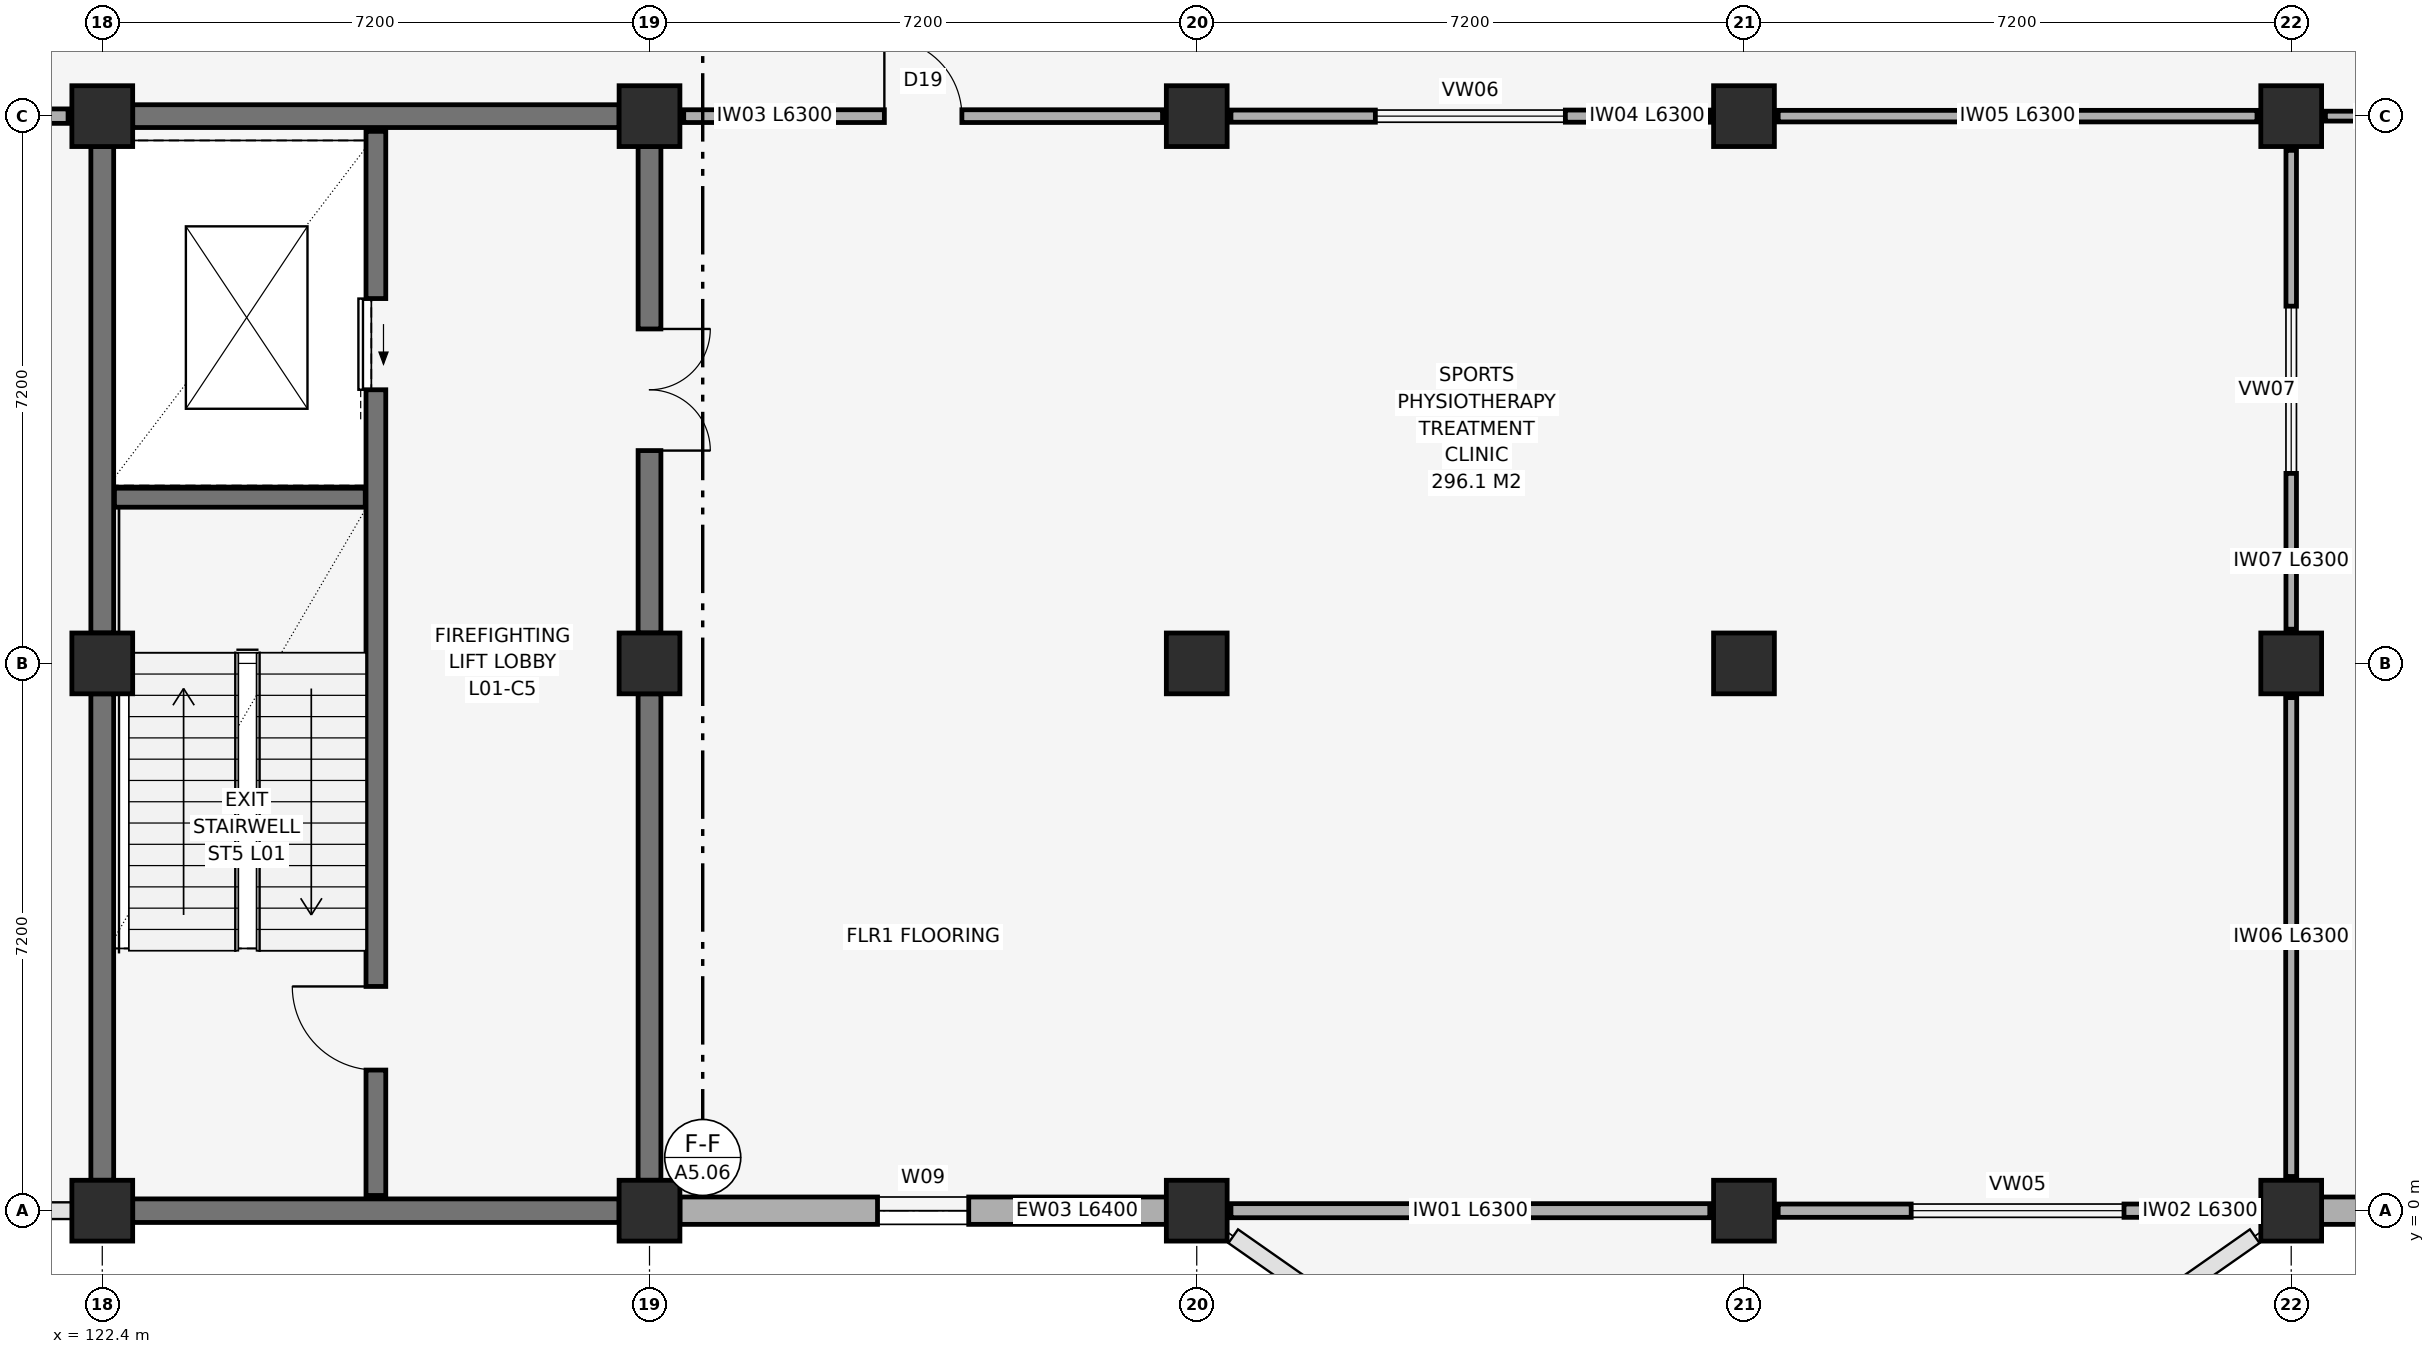
"""IFC4 building model, lengths in metres.
Left out: names, types, materials, properties, quantities, classifications, styles, units other than length and angle.
Written with IfcOpenShell. Run it as: python <this file> out.ifc"""

import sys

from ifc_helpers import new_model, si_unit, direction, frame, frame_2d, origin, origin_2d, place, context, subcontext, project, spatial, rectangle, extrude, element, fill, save


model = new_model("IFC4")
c1 = context("Model", 3, precision=1e-05, world=origin(), true_north=direction((0.0, 1.0)))
c2 = subcontext(c1, "Body", "Model", "MODEL_VIEW")
j1 = project(units=[si_unit("LENGTHUNIT", "METRE"), si_unit("PLANEANGLEUNIT", "RADIAN")], contexts=[c1])
p1 = place(None, origin())
s1 = spatial("IfcSite", under=j1, at=p1, CompositionType="ELEMENT")
p2 = place(p1, origin())
s2 = spatial("IfcBuilding", under=s1, at=p2, CompositionType="ELEMENT")
p3 = place(p2, frame((0.0, 0.0, 5.4)))
s3 = spatial("IfcBuildingStorey", under=s2, at=p3, CompositionType="ELEMENT", Elevation=5.4)
for number, where, z_axis, x_axis in (
    (1, (122.4, 0.0, 0.0), (0.0, 0.0, 1.0), (1.0, 0.0, 0.0)),
    (2, (122.4, 7.2, 0.0), (0.0, 0.0, 1.0), (1.0, 0.0, 0.0)),
    (3, (122.4, 14.4, 0.0), (0.0, 0.0, 1.0), (1.0, 0.0, 0.0)),
    (4, (129.6, 0.0, 0.0), (0.0, 0.0, 1.0), (1.0, 0.0, 0.0)),
    (5, (129.6, 7.2, 0.0), (0.0, 0.0, 1.0), (1.0, 0.0, 0.0)),
    (6, (129.6, 14.4, 0.0), (0.0, 0.0, 1.0), (1.0, 0.0, 0.0)),
    (7, (136.8, 0.0, 0.0), (0.0, 0.0, 1.0), (1.0, 0.0, 0.0)),
    (8, (136.8, 7.2, 0.0), (0.0, 0.0, 1.0), (1.0, 0.0, 0.0)),
    (9, (136.8, 14.4, 0.0), (0.0, 0.0, 1.0), (1.0, 0.0, 0.0)),
    (10, (144.0, 0.0, 0.0), (0.0, 0.0, 1.0), (1.0, 0.0, 0.0)),
    (11, (144.0, 7.2, 0.0), (0.0, 0.0, 1.0), (1.0, 0.0, 0.0)),
    (12, (144.0, 14.4, 0.0), (0.0, 0.0, 1.0), (1.0, 0.0, 0.0)),
    (13, (151.2, 0.0, 0.0), (0.0, 0.0, 1.0), (1.0, 0.0, 0.0)),
    (14, (151.2, 7.2, 0.0), (0.0, 0.0, 1.0), (1.0, 0.0, 0.0)),
    (15, (151.2, 14.4, 0.0), (0.0, 0.0, 1.0), (1.0, 0.0, 0.0)),
):
    element("IfcColumn", number, at=place(p3, frame(where, z_axis=z_axis, x_axis=x_axis)), inside=s3, PredefinedType="COLUMN", context=c2, shape_type="SweptSolid", body=[
        extrude(rectangle(XDim=0.8, YDim=0.8, at=origin_2d()), origin(), (0.0, 0.0, 1.0), 4.8),
    ])
p4 = place(p3, frame((130.0, 0.0, 0.0), z_axis=(0.0, 0.0, 1.0), x_axis=(1.0, 0.0, 0.0)))
e16 = element("IfcWall", 16, at=p4, inside=s3, PredefinedType="SOLIDWALL", context=c2, shape_type="SweptSolid", body=[
    extrude(rectangle(XDim=6.4, YDim=0.36, at=frame_2d((3.2, 0.0))), origin(), (0.0, 0.0, 1.0), 4.19),
])
p5 = place(p4, frame((2.6, 0.0, 0.95)))
e17 = element("IfcOpeningElement", 17, at=p5, cuts=e16, PredefinedType="OPENING", context=c2, shape_type="SweptSolid", body=[
    extrude(rectangle(XDim=1.2, YDim=2.0, at=frame_2d((0.6, 1.0))), frame((0.0, 0.195, 0.0), z_axis=(0.0, -1.0, 0.0), x_axis=(1.0, 0.0, 0.0)), (0.0, 0.0, 1.0), 0.39),
])
p6 = place(p3, frame((151.6, 0.0, 0.0), z_axis=(0.0, 0.0, 1.0), x_axis=(1.0, 0.0, 0.0)))
e18 = element("IfcWall", 18, at=p6, inside=s3, PredefinedType="SOLIDWALL", context=c2, shape_type="SweptSolid", body=[
    extrude(rectangle(XDim=6.4, YDim=0.36, at=frame_2d((3.2, 0.0))), origin(), (0.0, 0.0, 1.0), 4.19),
])
p7 = place(p6, frame((2.15, 0.0, 0.95)))
e19 = element("IfcOpeningElement", 19, at=p7, cuts=e18, PredefinedType="OPENING", context=c2, shape_type="SweptSolid", body=[
    extrude(rectangle(XDim=2.1, YDim=2.65, at=frame_2d((1.05, 1.325))), frame((0.0, 0.195, 0.0), z_axis=(0.0, -1.0, 0.0), x_axis=(1.0, 0.0, 0.0)), (0.0, 0.0, 1.0), 0.39),
])
p8 = place(p3, frame((122.8, 0.0, 0.0), z_axis=(0.0, 0.0, 1.0), x_axis=(1.0, 0.0, 0.0)))
e20 = element("IfcWall", 20, at=p8, inside=s3, PredefinedType="SHEAR", context=c2, shape_type="SweptSolid", body=[
    extrude(rectangle(XDim=6.4, YDim=0.31, at=frame_2d((3.2, 0.0))), origin(), (0.0, 0.0, 1.0), 4.54),
])
p9 = place(p3, frame((122.8, 14.4, 0.0), z_axis=(0.0, 0.0, 1.0), x_axis=(1.0, 0.0, 0.0)))
e21 = element("IfcWall", 21, at=p9, inside=s3, PredefinedType="SHEAR", context=c2, shape_type="SweptSolid", body=[
    extrude(rectangle(XDim=6.4, YDim=0.3, at=frame_2d((3.2, 0.0))), origin(), (0.0, 0.0, 1.0), 4.54),
])
p10 = place(p3, frame((122.4, 0.4, 0.0), z_axis=(0.0, 0.0, 1.0), x_axis=(0.0, 1.0, 0.0)))
e22 = element("IfcWall", 22, at=p10, inside=s3, PredefinedType="SHEAR", context=c2, shape_type="SweptSolid", body=[
    extrude(rectangle(XDim=6.4, YDim=0.3, at=frame_2d((3.2, 0.0))), origin(), (0.0, 0.0, 1.0), 4.54),
])
p11 = place(p3, frame((122.4, 7.6, 0.0), z_axis=(0.0, 0.0, 1.0), x_axis=(0.0, 1.0, 0.0)))
e23 = element("IfcWall", 23, at=p11, inside=s3, PredefinedType="SHEAR", context=c2, shape_type="SweptSolid", body=[
    extrude(rectangle(XDim=6.4, YDim=0.3, at=frame_2d((3.2, 0.0))), origin(), (0.0, 0.0, 1.0), 4.54),
])
p12 = place(p3, frame((129.6, 0.4, 0.0), z_axis=(0.0, 0.0, 1.0), x_axis=(0.0, 1.0, 0.0)))
e24 = element("IfcWall", 24, at=p12, inside=s3, PredefinedType="SHEAR", context=c2, shape_type="SweptSolid", body=[
    extrude(rectangle(XDim=6.4, YDim=0.3, at=frame_2d((3.2, 0.0))), origin(), (0.0, 0.0, 1.0), 4.54),
])
p13 = place(p3, frame((129.6, 7.6, 0.0), z_axis=(0.0, 0.0, 1.0), x_axis=(0.0, 1.0, 0.0)))
e25 = element("IfcWall", 25, at=p13, inside=s3, PredefinedType="SHEAR", context=c2, shape_type="SweptSolid", body=[
    extrude(rectangle(XDim=6.4, YDim=0.3, at=frame_2d((3.2, 0.0))), origin(), (0.0, 0.0, 1.0), 4.54),
])
p14 = place(p13, frame((2.4, 0.0, 0.0)))
e26 = element("IfcOpeningElement", 26, at=p14, cuts=e25, PredefinedType="OPENING", context=c2, shape_type="SweptSolid", body=[
    extrude(rectangle(XDim=1.6, YDim=2.2, at=frame_2d((0.8, 1.1))), frame((0.0, 0.165, 0.0), z_axis=(0.0, -1.0, 0.0), x_axis=(1.0, 0.0, 0.0)), (0.0, 0.0, 1.0), 0.33),
])
p15 = place(p3, frame((126.0, 0.2, 0.0), z_axis=(0.0, 0.0, 1.0), x_axis=(0.0, 1.0, 0.0)))
e27 = element("IfcWall", 27, at=p15, inside=s3, PredefinedType="SHEAR", context=c2, shape_type="SweptSolid", body=[
    extrude(rectangle(XDim=14.0, YDim=0.26, at=frame_2d((7.0, 0.0))), origin(), (0.0, 0.0, 1.0), 4.54),
])
p16 = place(p15, frame((1.65, 0.0, 0.0)))
e28 = element("IfcOpeningElement", 28, at=p16, cuts=e27, PredefinedType="OPENING", context=c2, shape_type="SweptSolid", body=[
    extrude(rectangle(XDim=1.1, YDim=2.15, at=frame_2d((0.55, 1.075))), frame((0.0, 0.145, 0.0), z_axis=(0.0, -1.0, 0.0), x_axis=(1.0, 0.0, 0.0)), (0.0, 0.0, 1.0), 0.29),
])
p17 = place(p15, frame((10.6, 0.0, 0.0)))
e29 = element("IfcOpeningElement", 29, at=p17, cuts=e27, PredefinedType="OPENING", context=c2, shape_type="SweptSolid", body=[
    extrude(rectangle(XDim=1.2, YDim=2.25, at=frame_2d((0.6, 1.125))), frame((0.0, 0.145, 0.0), z_axis=(0.0, -1.0, 0.0), x_axis=(1.0, 0.0, 0.0)), (0.0, 0.0, 1.0), 0.29),
])
p18 = place(p3, frame((122.56, 9.38, 0.0), z_axis=(0.0, 0.0, 1.0), x_axis=(1.0, 0.0, 0.0)))
e30 = element("IfcWall", 30, at=p18, inside=s3, PredefinedType="SHEAR", context=c2, shape_type="SweptSolid", body=[
    extrude(rectangle(XDim=3.3, YDim=0.25, at=frame_2d((1.65, 0.0))), origin(), (0.0, 0.0, 1.0), 4.54),
])
p19 = place(p3, frame((115.65, 14.4, 0.0), z_axis=(0.0, 0.0, 1.0), x_axis=(1.0, 0.0, 0.0)))
e31 = element("IfcWall", 31, at=p19, inside=s3, PredefinedType="SOLIDWALL", context=c2, shape_type="SweptSolid", body=[
    extrude(rectangle(XDim=6.3, YDim=0.19, at=frame_2d((3.15, 0.0))), origin(), (0.0, 0.0, 1.0), 3.952),
])
p20 = place(p19, frame((2.4, 0.0, 0.0)))
e32 = element("IfcOpeningElement", 32, at=p20, cuts=e31, PredefinedType="OPENING", context=c2, shape_type="SweptSolid", body=[
    extrude(rectangle(XDim=1.5, YDim=2.2, at=frame_2d((0.75, 1.1))), frame((0.0, 0.11, 0.0), z_axis=(0.0, -1.0, 0.0), x_axis=(1.0, 0.0, 0.0)), (0.0, 0.0, 1.0), 0.22),
])
p21 = place(p3, frame((137.25, 0.0, 0.0), z_axis=(0.0, 0.0, 1.0), x_axis=(1.0, 0.0, 0.0)))
e33 = element("IfcWall", 33, at=p21, inside=s3, PredefinedType="PARTITIONING", context=c2, shape_type="SweptSolid", body=[
    extrude(rectangle(XDim=6.3, YDim=0.185, at=frame_2d((3.15, 0.0))), origin(), (0.0, 0.0, 1.0), 4.19),
])
p22 = place(p3, frame((144.45, 0.0, 0.0), z_axis=(0.0, 0.0, 1.0), x_axis=(1.0, 0.0, 0.0)))
e34 = element("IfcWall", 34, at=p22, inside=s3, PredefinedType="PARTITIONING", context=c2, shape_type="SweptSolid", body=[
    extrude(rectangle(XDim=6.3, YDim=0.175, at=frame_2d((3.15, 0.0))), origin(), (0.0, 0.0, 1.0), 4.19),
])
p23 = place(p22, frame((1.75, 0.0, 0.95)))
e35 = element("IfcOpeningElement", 35, at=p23, cuts=e34, PredefinedType="OPENING", context=c2, shape_type="SweptSolid", body=[
    extrude(rectangle(XDim=2.8, YDim=1.35, at=frame_2d((1.4, 0.675))), frame((0.0, 0.103, 0.0), z_axis=(0.0, -1.0, 0.0), x_axis=(1.0, 0.0, 0.0)), (0.0, 0.0, 1.0), 0.205),
])
p24 = place(p3, frame((130.05, 14.4, 0.0), z_axis=(0.0, 0.0, 1.0), x_axis=(1.0, 0.0, 0.0)))
e36 = element("IfcWall", 36, at=p24, inside=s3, PredefinedType="PARTITIONING", context=c2, shape_type="SweptSolid", body=[
    extrude(rectangle(XDim=6.3, YDim=0.168, at=frame_2d((3.15, 0.0))), origin(), (0.0, 0.0, 1.0), 3.952),
])
p25 = place(p24, frame((2.64, 0.0, 0.0)))
e37 = element("IfcOpeningElement", 37, at=p25, cuts=e36, PredefinedType="OPENING", context=c2, shape_type="SweptSolid", body=[
    extrude(rectangle(XDim=1.02, YDim=2.15, at=frame_2d((0.51, 1.075))), frame((0.0, 0.099, 0.0), z_axis=(0.0, -1.0, 0.0), x_axis=(1.0, 0.0, 0.0)), (0.0, 0.0, 1.0), 0.198),
])
p26 = place(p3, frame((137.25, 14.4, 0.0), z_axis=(0.0, 0.0, 1.0), x_axis=(1.0, 0.0, 0.0)))
e38 = element("IfcWall", 38, at=p26, inside=s3, PredefinedType="PARTITIONING", context=c2, shape_type="SweptSolid", body=[
    extrude(rectangle(XDim=6.3, YDim=0.16, at=frame_2d((3.15, 0.0))), origin(), (0.0, 0.0, 1.0), 3.952),
])
p27 = place(p26, frame((1.9, 0.0, 0.95)))
e39 = element("IfcOpeningElement", 39, at=p27, cuts=e38, PredefinedType="OPENING", context=c2, shape_type="SweptSolid", body=[
    extrude(rectangle(XDim=2.5, YDim=1.35, at=frame_2d((1.25, 0.675))), frame((0.0, 0.095, 0.0), z_axis=(0.0, -1.0, 0.0), x_axis=(1.0, 0.0, 0.0)), (0.0, 0.0, 1.0), 0.19),
])
p28 = place(p3, frame((144.45, 14.4, 0.0), z_axis=(0.0, 0.0, 1.0), x_axis=(1.0, 0.0, 0.0)))
e40 = element("IfcWall", 40, at=p28, inside=s3, PredefinedType="PARTITIONING", context=c2, shape_type="SweptSolid", body=[
    extrude(rectangle(XDim=6.3, YDim=0.152, at=frame_2d((3.15, 0.0))), origin(), (0.0, 0.0, 1.0), 3.952),
])
p29 = place(p3, frame((151.2, 0.45, 0.0), z_axis=(0.0, 0.0, 1.0), x_axis=(0.0, 1.0, 0.0)))
e41 = element("IfcWall", 41, at=p29, inside=s3, PredefinedType="PARTITIONING", context=c2, shape_type="SweptSolid", body=[
    extrude(rectangle(XDim=6.3, YDim=0.145, at=frame_2d((3.15, 0.0))), origin(), (0.0, 0.0, 1.0), 3.74),
])
p30 = place(p3, frame((151.2, 7.65, 0.0), z_axis=(0.0, 0.0, 1.0), x_axis=(0.0, 1.0, 0.0)))
e42 = element("IfcWall", 42, at=p30, inside=s3, PredefinedType="PARTITIONING", context=c2, shape_type="SweptSolid", body=[
    extrude(rectangle(XDim=6.3, YDim=0.138, at=frame_2d((3.15, 0.0))), origin(), (0.0, 0.0, 1.0), 4.052),
])
p31 = place(p30, frame((2.05, 0.0, 0.95)))
e43 = element("IfcOpeningElement", 43, at=p31, cuts=e42, PredefinedType="OPENING", context=c2, shape_type="SweptSolid", body=[
    extrude(rectangle(XDim=2.2, YDim=1.35, at=frame_2d((1.1, 0.675))), frame((0.0, 0.084, 0.0), z_axis=(0.0, -1.0, 0.0), x_axis=(1.0, 0.0, 0.0)), (0.0, 0.0, 1.0), 0.168),
])
p32 = place(p3, frame((151.65, 14.4, 0.0), z_axis=(0.0, 0.0, 1.0), x_axis=(1.0, 0.0, 0.0)))
e44 = element("IfcWall", 44, at=p32, inside=s3, PredefinedType="PARTITIONING", context=c2, shape_type="SweptSolid", body=[
    extrude(rectangle(XDim=6.3, YDim=0.13, at=frame_2d((3.15, 0.0))), origin(), (0.0, 0.0, 1.0), 3.952),
])
p33 = place(p32, frame((2.58, 0.0, 0.0)))
e45 = element("IfcOpeningElement", 45, at=p33, cuts=e44, PredefinedType="OPENING", context=c2, shape_type="SweptSolid", body=[
    extrude(rectangle(XDim=1.14, YDim=2.15, at=frame_2d((0.57, 1.075))), frame((0.0, 0.08, 0.0), z_axis=(0.0, -1.0, 0.0), x_axis=(1.0, 0.0, 0.0)), (0.0, 0.0, 1.0), 0.16),
])
p34 = place(p5, origin())
e46 = element("IfcWindow", 46, at=p34, inside=s3, PartitioningType="SINGLE_PANEL", PredefinedType="WINDOW", context=c2, shape_type="SweptSolid", body=[
    extrude(rectangle(XDim=1.2, YDim=2.0, at=frame_2d((0.6, 1.0))), frame((0.0, 0.03, 0.0), z_axis=(0.0, -1.0, 0.0), x_axis=(1.0, 0.0, 0.0)), (0.0, 0.0, 1.0), 0.06),
])
fill(e17, e46)
p35 = place(p16, origin())
e47 = element("IfcDoor", 47, at=p35, inside=s3, OperationType="SINGLE_SWING_RIGHT", PredefinedType="DOOR", context=c2, shape_type="SweptSolid", body=[
    extrude(rectangle(XDim=1.1, YDim=2.15, at=frame_2d((0.55, 1.075))), frame((0.0, 0.025, 0.0), z_axis=(0.0, -1.0, 0.0), x_axis=(1.0, 0.0, 0.0)), (0.0, 0.0, 1.0), 0.05),
])
fill(e28, e47)
p36 = place(p17, frame((1.2, 0.0, 0.0), z_axis=(0.0, 0.0, 1.0), x_axis=(-1.0, 0.0, 0.0)))
e48 = element("IfcDoor", 48, at=p36, inside=s3, OperationType="SLIDING_TO_LEFT", PredefinedType="DOOR", context=c2, shape_type="SweptSolid", body=[
    extrude(rectangle(XDim=1.2, YDim=2.25, at=frame_2d((0.6, 1.125))), frame((0.0, 0.025, 0.0), z_axis=(0.0, -1.0, 0.0), x_axis=(1.0, 0.0, 0.0)), (0.0, 0.0, 1.0), 0.05),
])
fill(e29, e48)
p37 = place(p14, frame((1.6, 0.0, 0.0), z_axis=(0.0, 0.0, 1.0), x_axis=(-1.0, 0.0, 0.0)))
e49 = element("IfcDoor", 49, at=p37, inside=s3, OperationType="DOUBLE_SWING_LEFT", PredefinedType="DOOR", context=c2, shape_type="SweptSolid", body=[
    extrude(rectangle(XDim=1.6, YDim=2.2, at=frame_2d((0.8, 1.1))), frame((0.0, 0.025, 0.0), z_axis=(0.0, -1.0, 0.0), x_axis=(1.0, 0.0, 0.0)), (0.0, 0.0, 1.0), 0.05),
])
fill(e26, e49)
p38 = place(p23, origin())
e50 = element("IfcWindow", 50, at=p38, inside=s3, PartitioningType="SINGLE_PANEL", PredefinedType="WINDOW", context=c2, shape_type="SweptSolid", body=[
    extrude(rectangle(XDim=2.8, YDim=1.35, at=frame_2d((1.4, 0.675))), frame((0.0, 0.03, 0.0), z_axis=(0.0, -1.0, 0.0), x_axis=(1.0, 0.0, 0.0)), (0.0, 0.0, 1.0), 0.06),
])
fill(e35, e50)
p39 = place(p25, frame((1.02, 0.0, 0.0), z_axis=(0.0, 0.0, 1.0), x_axis=(-1.0, 0.0, 0.0)))
e51 = element("IfcDoor", 51, at=p39, inside=s3, OperationType="SINGLE_SWING_RIGHT", PredefinedType="DOOR", context=c2, shape_type="SweptSolid", body=[
    extrude(rectangle(XDim=1.02, YDim=2.15, at=frame_2d((0.51, 1.075))), frame((0.0, 0.025, 0.0), z_axis=(0.0, -1.0, 0.0), x_axis=(1.0, 0.0, 0.0)), (0.0, 0.0, 1.0), 0.05),
])
fill(e37, e51)
p40 = place(p27, origin())
e52 = element("IfcWindow", 52, at=p40, inside=s3, PartitioningType="SINGLE_PANEL", PredefinedType="WINDOW", context=c2, shape_type="SweptSolid", body=[
    extrude(rectangle(XDim=2.5, YDim=1.35, at=frame_2d((1.25, 0.675))), frame((0.0, 0.03, 0.0), z_axis=(0.0, -1.0, 0.0), x_axis=(1.0, 0.0, 0.0)), (0.0, 0.0, 1.0), 0.06),
])
fill(e39, e52)
p41 = place(p31, origin())
e53 = element("IfcWindow", 53, at=p41, inside=s3, PartitioningType="SINGLE_PANEL", PredefinedType="WINDOW", context=c2, shape_type="SweptSolid", body=[
    extrude(rectangle(XDim=2.2, YDim=1.35, at=frame_2d((1.1, 0.675))), frame((0.0, 0.03, 0.0), z_axis=(0.0, -1.0, 0.0), x_axis=(1.0, 0.0, 0.0)), (0.0, 0.0, 1.0), 0.06),
])
fill(e43, e53)
save(model, sys.argv[1])
